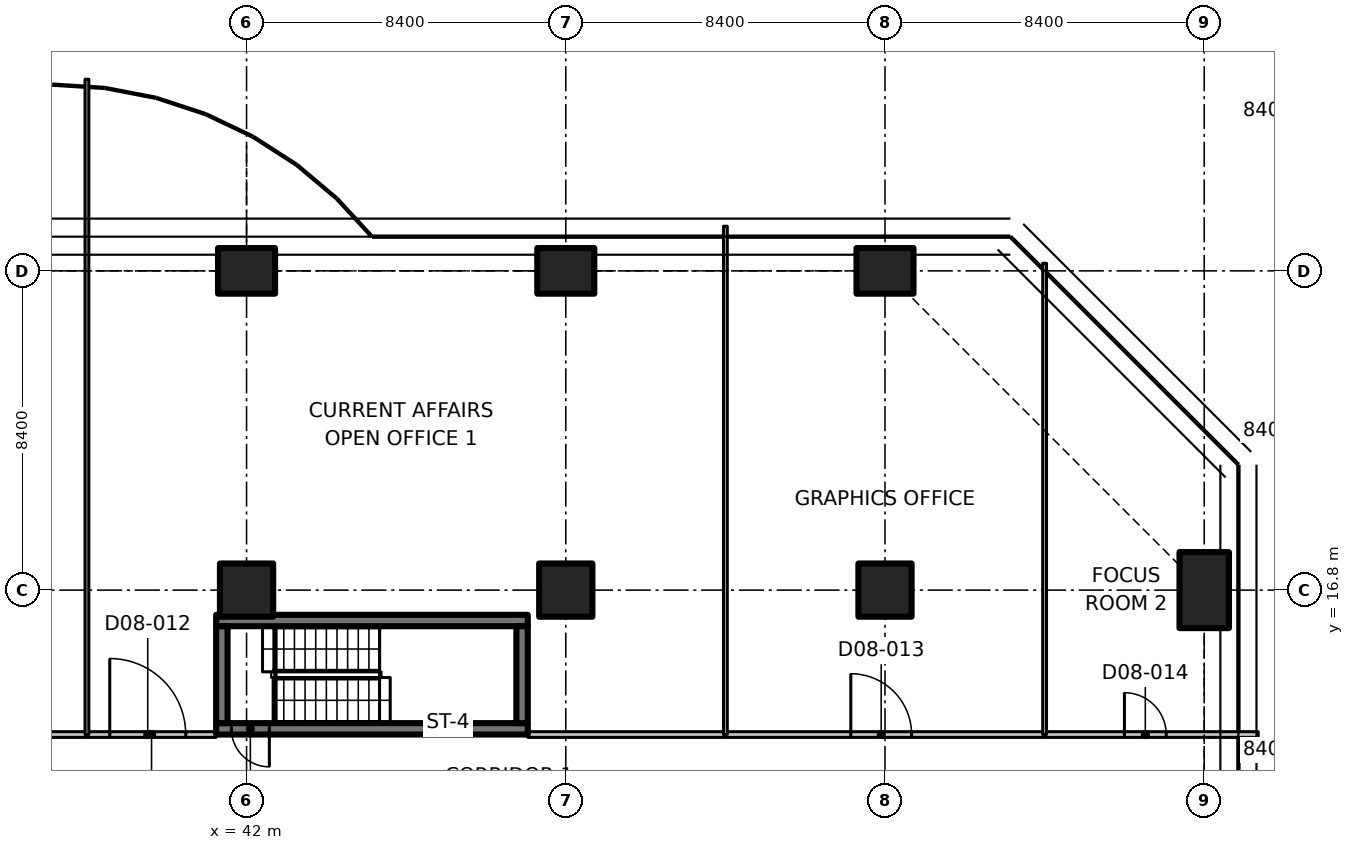
"""IFC4 building model, lengths in metres.
Left out: names, types, materials, properties, quantities, classifications, styles, units other than length and angle.
Written with IfcOpenShell. Run it as: python <this file> out.ifc"""

import sys

from ifc_helpers import new_model, si_unit, direction, frame, frame_2d, origin, origin_2d, place, context, subcontext, project, spatial, polyline, rectangle, outline, extrude, element, fill, save


model = new_model("IFC4")
c1 = context("Model", 3, precision=1e-05, world=origin(), true_north=direction((0.0, 1.0)))
c2 = subcontext(c1, "Body", "Model", "MODEL_VIEW")
j1 = project(units=[si_unit("LENGTHUNIT", "METRE"), si_unit("PLANEANGLEUNIT", "RADIAN")], contexts=[c1])
p1 = place(None, origin())
s1 = spatial("IfcSite", under=j1, at=p1, CompositionType="ELEMENT")
p2 = place(p1, origin())
s2 = spatial("IfcBuilding", under=s1, at=p2, CompositionType="ELEMENT")
p3 = place(p2, frame((0.0, 0.0, 50.9)))
s3 = spatial("IfcBuildingStorey", under=s2, at=p3, CompositionType="ELEMENT", Elevation=50.9)
p4 = place(p3, frame((42.0, 16.8, 0.0), z_axis=(0.0, 0.0, 1.0), x_axis=(1.0, 0.0, 0.0)))
e1 = element("IfcColumn", 1, at=p4, inside=s3, PredefinedType="COLUMN", context=c2, shape_type="SweptSolid", body=[
    extrude(rectangle(XDim=1.4, YDim=1.4, at=origin_2d()), origin(), (0.0, 0.0, 1.0), 3.35),
])
p5 = place(p3, frame((42.0, 25.2, 0.0), z_axis=(0.0, 0.0, 1.0), x_axis=(0.0, 1.0, 0.0)))
e2 = element("IfcColumn", 2, at=p5, inside=s3, PredefinedType="COLUMN", context=c2, shape_type="SweptSolid", body=[
    extrude(rectangle(XDim=1.2, YDim=1.5, at=origin_2d()), origin(), (0.0, 0.0, 1.0), 3.35),
])
p6 = place(p3, frame((50.4, 16.8, 0.0), z_axis=(0.0, 0.0, 1.0), x_axis=(1.0, 0.0, 0.0)))
e3 = element("IfcColumn", 3, at=p6, inside=s3, PredefinedType="COLUMN", context=c2, shape_type="SweptSolid", body=[
    extrude(rectangle(XDim=1.4, YDim=1.4, at=origin_2d()), origin(), (0.0, 0.0, 1.0), 3.35),
])
p7 = place(p3, frame((50.4, 25.2, 0.0), z_axis=(0.0, 0.0, 1.0), x_axis=(0.0, 1.0, 0.0)))
e4 = element("IfcColumn", 4, at=p7, inside=s3, PredefinedType="COLUMN", context=c2, shape_type="SweptSolid", body=[
    extrude(rectangle(XDim=1.2, YDim=1.5, at=origin_2d()), origin(), (0.0, 0.0, 1.0), 3.35),
])
p8 = place(p3, frame((58.8, 16.8, 0.0), z_axis=(0.0, 0.0, 1.0), x_axis=(1.0, 0.0, 0.0)))
e5 = element("IfcColumn", 5, at=p8, inside=s3, PredefinedType="COLUMN", context=c2, shape_type="SweptSolid", body=[
    extrude(rectangle(XDim=1.4, YDim=1.4, at=origin_2d()), origin(), (0.0, 0.0, 1.0), 3.35),
])
p9 = place(p3, frame((58.8, 25.2, 0.0), z_axis=(0.0, 0.0, 1.0), x_axis=(0.0, 1.0, 0.0)))
e6 = element("IfcColumn", 6, at=p9, inside=s3, PredefinedType="COLUMN", context=c2, shape_type="SweptSolid", body=[
    extrude(rectangle(XDim=1.2, YDim=1.5, at=origin_2d()), origin(), (0.0, 0.0, 1.0), 3.35),
])
p10 = place(p3, frame((67.2, 16.8, 0.0), z_axis=(0.0, 0.0, 1.0), x_axis=(1.0, 0.0, 0.0)))
e7 = element("IfcColumn", 7, at=p10, inside=s3, PredefinedType="COLUMN", context=c2, shape_type="SweptSolid", body=[
    extrude(rectangle(XDim=1.3, YDim=2.0, at=origin_2d()), origin(), (0.0, 0.0, 1.0), 3.35),
])
p11 = place(p3, frame((49.4, 13.15, 0.0), z_axis=(0.0, 0.0, 1.0), x_axis=(-1.0, 0.0, 0.0)))
e8 = element("IfcWall", 8, at=p11, inside=s3, PredefinedType="SHEAR", context=c2, shape_type="SweptSolid", body=[
    extrude(rectangle(XDim=8.2, YDim=0.3, at=frame_2d((4.1, 0.0))), origin(), (0.0, 0.0, 1.0), 3.35),
])
p12 = place(p11, frame((6.8, 0.0, 0.0)))
e9 = element("IfcOpeningElement", 9, at=p12, cuts=e8, PredefinedType="OPENING", context=c2, shape_type="SweptSolid", body=[
    extrude(rectangle(XDim=1.0, YDim=2.1, at=frame_2d((0.5, 1.05))), frame((0.0, 0.16, 0.0), z_axis=(0.0, -1.0, 0.0), x_axis=(1.0, 0.0, 0.0)), (0.0, 0.0, 1.0), 0.32),
])
p13 = place(p3, frame((41.2, 16.0, 0.0), z_axis=(0.0, 0.0, 1.0), x_axis=(1.0, 0.0, 0.0)))
e10 = element("IfcWall", 10, at=p13, inside=s3, PredefinedType="SHEAR", context=c2, shape_type="SweptSolid", body=[
    extrude(rectangle(XDim=8.2, YDim=0.3, at=frame_2d((4.1, 0.0))), origin(), (0.0, 0.0, 1.0), 3.35),
])
for number, where, z_axis, x_axis in (
    (11, (41.35, 13.3, 0.0), (0.0, 0.0, 1.0), (0.0, 1.0, 0.0)),
    (12, (49.25, 13.3, 0.0), (0.0, 0.0, 1.0), (0.0, 1.0, 0.0)),
):
    element("IfcWall", number, at=place(p3, frame(where, z_axis=z_axis, x_axis=x_axis)), inside=s3, PredefinedType="SHEAR", context=c2, shape_type="SweptSolid", body=[
        extrude(rectangle(XDim=2.55, YDim=0.3, at=frame_2d((1.275, 0.0))), origin(), (0.0, 0.0, 1.0), 3.35),
    ])
p14 = place(p3, frame((29.4, 13.0, 0.0), z_axis=(0.0, 0.0, 1.0), x_axis=(1.0, 0.0, 0.0)))
e13 = element("IfcWall", 13, at=p14, inside=s3, PredefinedType="PARTITIONING", context=c2, shape_type="SweptSolid", body=[
    extrude(rectangle(XDim=8.4, YDim=0.15, at=frame_2d((4.2, 0.0))), origin(), (0.0, 0.0, 1.0), 3.33),
])
p15 = place(p14, frame((3.3, 0.0, 0.0)))
e14 = element("IfcOpeningElement", 14, at=p15, cuts=e13, PredefinedType="OPENING", context=c2, shape_type="SweptSolid", body=[
    extrude(rectangle(XDim=1.8, YDim=2.1, at=frame_2d((0.9, 1.05))), frame((0.0, 0.085, 0.0), z_axis=(0.0, -1.0, 0.0), x_axis=(1.0, 0.0, 0.0)), (0.0, 0.0, 1.0), 0.17),
])
p16 = place(p3, frame((37.8, 13.0, 0.0), z_axis=(0.0, 0.0, 1.0), x_axis=(1.0, 0.0, 0.0)))
e15 = element("IfcWall", 15, at=p16, inside=s3, PredefinedType="PARTITIONING", context=c2, shape_type="SweptSolid", body=[
    extrude(rectangle(XDim=3.4, YDim=0.15, at=frame_2d((1.7, 0.0))), origin(), (0.0, 0.0, 1.0), 3.33),
])
p17 = place(p16, frame((0.6, 0.0, 0.0)))
e16 = element("IfcOpeningElement", 16, at=p17, cuts=e15, PredefinedType="OPENING", context=c2, shape_type="SweptSolid", body=[
    extrude(rectangle(XDim=2.0, YDim=2.4, at=frame_2d((1.0, 1.2))), frame((0.0, 0.085, 0.0), z_axis=(0.0, -1.0, 0.0), x_axis=(1.0, 0.0, 0.0)), (0.0, 0.0, 1.0), 0.17),
])
p18 = place(p3, frame((49.4, 13.0, 0.0), z_axis=(0.0, 0.0, 1.0), x_axis=(1.0, 0.0, 0.0)))
e17 = element("IfcWall", 17, at=p18, inside=s3, PredefinedType="PARTITIONING", context=c2, shape_type="SweptSolid", body=[
    extrude(rectangle(XDim=5.2, YDim=0.15, at=frame_2d((2.6, 0.0))), origin(), (0.0, 0.0, 1.0), 3.33),
])
p19 = place(p3, frame((54.6, 13.0, 0.0), z_axis=(0.0, 0.0, 1.0), x_axis=(1.0, 0.0, 0.0)))
e18 = element("IfcWall", 18, at=p19, inside=s3, PredefinedType="PARTITIONING", context=c2, shape_type="SweptSolid", body=[
    extrude(rectangle(XDim=8.4, YDim=0.15, at=frame_2d((4.2, 0.0))), origin(), (0.0, 0.0, 1.0), 3.33),
])
p20 = place(p19, frame((3.3, 0.0, 0.0)))
e19 = element("IfcOpeningElement", 19, at=p20, cuts=e18, PredefinedType="OPENING", context=c2, shape_type="SweptSolid", body=[
    extrude(rectangle(XDim=1.6, YDim=2.1, at=frame_2d((0.8, 1.05))), frame((0.0, 0.085, 0.0), z_axis=(0.0, -1.0, 0.0), x_axis=(1.0, 0.0, 0.0)), (0.0, 0.0, 1.0), 0.17),
])
p21 = place(p3, frame((63.0, 13.0, 0.0), z_axis=(0.0, 0.0, 1.0), x_axis=(1.0, 0.0, 0.0)))
e20 = element("IfcWall", 20, at=p21, inside=s3, PredefinedType="PARTITIONING", context=c2, shape_type="SweptSolid", body=[
    extrude(outline(polyline([(0.0, 0.0), (5.619, 0.0), (5.619, 3.33), (5.28, 3.33), (4.65, 3.33), (4.648, 2.98), (3.752, 2.98), (3.75, 3.33), (0.0, 3.33), (0.0, 0.0)])), frame((0.0, 0.075, 0.0), z_axis=(0.0, -1.0, 0.0), x_axis=(1.0, 0.0, 0.0)), (0.0, 0.0, 1.0), 0.15),
])
p22 = place(p21, frame((2.1, 0.0, 0.0)))
e21 = element("IfcOpeningElement", 21, at=p22, cuts=e20, PredefinedType="OPENING", context=c2, shape_type="SweptSolid", body=[
    extrude(rectangle(XDim=1.1, YDim=2.1, at=frame_2d((0.55, 1.05))), frame((0.0, 0.085, 0.0), z_axis=(0.0, -1.0, 0.0), x_axis=(1.0, 0.0, 0.0)), (0.0, 0.0, 1.0), 0.17),
])
p23 = place(p3, frame((37.8, 30.243, 0.0), z_axis=(0.0, 0.0, 1.0), x_axis=(0.0, -1.0, 0.0)))
e22 = element("IfcWall", 22, at=p23, inside=s3, PredefinedType="PARTITIONING", context=c2, shape_type="SweptSolid", body=[
    extrude(outline(polyline([(0.0, 0.0), (17.243, 0.0), (17.243, 3.33), (5.493, 3.33), (5.491, 2.98), (4.595, 2.98), (4.593, 3.33), (0.0, 3.33), (0.0, 0.0)])), frame((0.0, 0.05, 0.0), z_axis=(0.0, -1.0, 0.0), x_axis=(1.0, 0.0, 0.0)), (0.0, 0.0, 1.0), 0.1),
])
p24 = place(p3, frame((54.6, 26.374, 0.0), z_axis=(0.0, 0.0, 1.0), x_axis=(0.0, -1.0, 0.0)))
e23 = element("IfcWall", 23, at=p24, inside=s3, PredefinedType="PARTITIONING", context=c2, shape_type="SweptSolid", body=[
    extrude(outline(polyline([(0.0, 0.0), (13.374, 0.0), (13.374, 3.33), (1.624, 3.33), (1.622, 2.98), (0.726, 2.98), (0.724, 3.33), (0.074, 3.33), (0.0, 3.33), (0.0, 0.0)])), frame((0.0, 0.05, 0.0), z_axis=(0.0, -1.0, 0.0), x_axis=(1.0, 0.0, 0.0)), (0.0, 0.0, 1.0), 0.1),
])
p25 = place(p3, frame((63.0, 25.4, 0.0), z_axis=(0.0, 0.0, 1.0), x_axis=(0.0, -1.0, 0.0)))
e24 = element("IfcWall", 24, at=p25, inside=s3, PredefinedType="PARTITIONING", context=c2, shape_type="SweptSolid", body=[
    extrude(outline(polyline([(0.0, 0.0), (12.4, 0.0), (12.4, 3.33), (5.066, 3.33), (5.064, 2.98), (3.736, 2.98), (3.734, 3.33), (0.0, 3.33), (0.0, 0.0)])), frame((0.0, 0.05, 0.0), z_axis=(0.0, -1.0, 0.0), x_axis=(1.0, 0.0, 0.0)), (0.0, 0.0, 1.0), 0.1),
])
p26 = place(p12, origin())
e25 = element("IfcDoor", 25, at=p26, inside=s3, OperationType="SINGLE_SWING_LEFT", PredefinedType="DOOR", context=c2, shape_type="SweptSolid", body=[
    extrude(rectangle(XDim=1.0, YDim=2.1, at=frame_2d((0.5, 1.05))), frame((0.0, 0.025, 0.0), z_axis=(0.0, -1.0, 0.0), x_axis=(1.0, 0.0, 0.0)), (0.0, 0.0, 1.0), 0.05),
])
fill(e9, e25)
p27 = place(p17, origin())
e26 = element("IfcDoor", 26, at=p27, inside=s3, OperationType="DOUBLE_DOOR_SINGLE_SWING", PredefinedType="DOOR", context=c2, shape_type="SweptSolid", body=[
    extrude(rectangle(XDim=2.0, YDim=2.4, at=frame_2d((1.0, 1.2))), frame((0.0, 0.025, 0.0), z_axis=(0.0, -1.0, 0.0), x_axis=(1.0, 0.0, 0.0)), (0.0, 0.0, 1.0), 0.05),
])
fill(e16, e26)
p28 = place(p20, origin())
e27 = element("IfcDoor", 27, at=p28, inside=s3, OperationType="DOUBLE_DOOR_SINGLE_SWING", PredefinedType="DOOR", context=c2, shape_type="SweptSolid", body=[
    extrude(rectangle(XDim=1.6, YDim=2.1, at=frame_2d((0.8, 1.05))), frame((0.0, 0.025, 0.0), z_axis=(0.0, -1.0, 0.0), x_axis=(1.0, 0.0, 0.0)), (0.0, 0.0, 1.0), 0.05),
])
fill(e19, e27)
p29 = place(p22, origin())
e28 = element("IfcDoor", 28, at=p29, inside=s3, OperationType="SINGLE_SWING_LEFT", PredefinedType="DOOR", context=c2, shape_type="SweptSolid", body=[
    extrude(rectangle(XDim=1.1, YDim=2.1, at=frame_2d((0.55, 1.05))), frame((0.0, 0.025, 0.0), z_axis=(0.0, -1.0, 0.0), x_axis=(1.0, 0.0, 0.0)), (0.0, 0.0, 1.0), 0.05),
])
fill(e21, e28)
save(model, sys.argv[1])
